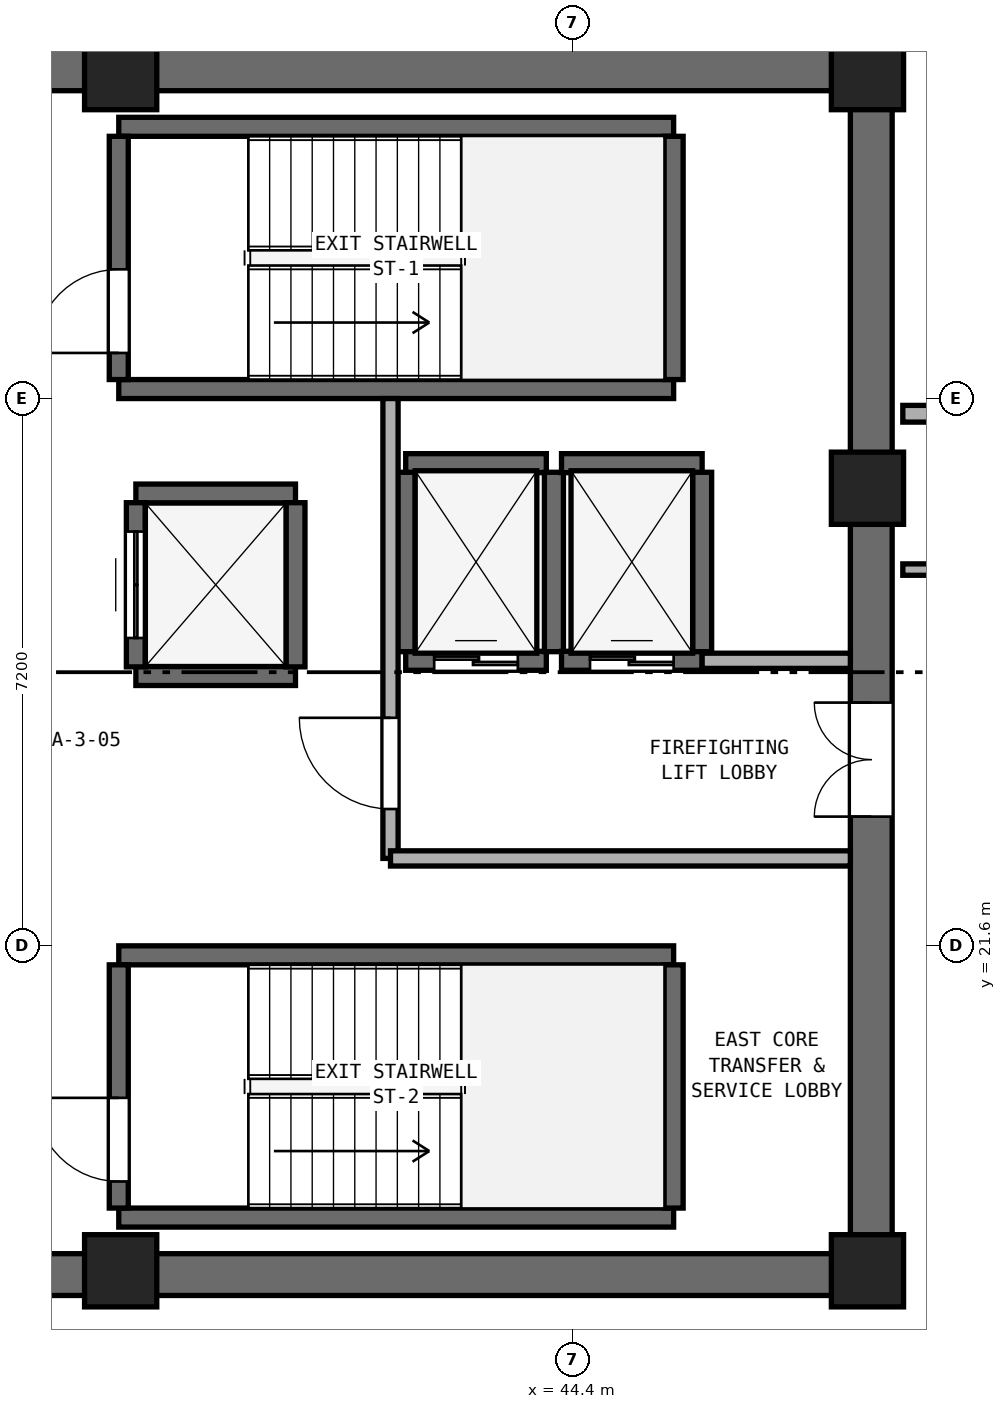
"""IFC4 building model, lengths in metres.
Left out: names, types, materials, properties, quantities, classifications, styles, units other than length and angle.
Written with IfcOpenShell. Run it as: python <this file> out.ifc"""

import sys

from ifc_helpers import new_model, si_unit, direction, frame, frame_2d, origin, origin_2d, place, context, subcontext, project, spatial, rectangle, extrude, element, fill, save


model = new_model("IFC4")
c1 = context("Model", 3, precision=1e-05, world=origin(), true_north=direction((0.0, 1.0)))
c2 = subcontext(c1, "Body", "Model", "MODEL_VIEW")
j1 = project(units=[si_unit("LENGTHUNIT", "METRE"), si_unit("PLANEANGLEUNIT", "RADIAN")], contexts=[c1])
p1 = place(None, origin())
s1 = spatial("IfcSite", under=j1, at=p1, CompositionType="ELEMENT")
p2 = place(p1, origin())
s2 = spatial("IfcBuilding", under=s1, at=p2, CompositionType="ELEMENT")
p3 = place(p2, frame((0.0, 0.0, 151.6)))
s3 = spatial("IfcBuildingStorey", under=s2, at=p3, CompositionType="ELEMENT", Elevation=151.6)
for number, where, z_axis, x_axis in (
    (1, (25.4, 17.275, 0.0), (0.0, 0.0, 1.0), (1.0, 0.0, 0.0)),
    (2, (25.4, 33.125, 0.0), (0.0, 0.0, 1.0), (1.0, 0.0, 0.0)),
):
    element("IfcWall", number, at=place(p3, frame(where, z_axis=z_axis, x_axis=x_axis)), inside=s3, PredefinedType="SHEAR", context=c2, shape_type="SweptSolid", body=[
        extrude(rectangle(XDim=23.2, YDim=0.55, at=frame_2d((11.6, 0.0))), origin(), (0.0, 0.0, 1.0), 3.54),
    ])
p4 = place(p3, frame((48.325, 17.55, 0.0), z_axis=(0.0, 0.0, 1.0), x_axis=(0.0, 1.0, 0.0)))
e3 = element("IfcWall", 3, at=p4, inside=s3, PredefinedType="SHEAR", context=c2, shape_type="SweptSolid", body=[
    extrude(rectangle(XDim=15.3, YDim=0.55, at=frame_2d((7.65, 0.0))), origin(), (0.0, 0.0, 1.0), 3.54),
])
p5 = place(p4, frame((5.75, 0.0, 0.0)))
e4 = element("IfcOpeningElement", 4, at=p5, cuts=e3, PredefinedType="OPENING", context=c2, shape_type="SweptSolid", body=[
    extrude(rectangle(XDim=1.5, YDim=2.15, at=frame_2d((0.75, 1.075))), frame((0.0, 0.285, 0.0), z_axis=(0.0, -1.0, 0.0), x_axis=(1.0, 0.0, 0.0)), (0.0, 0.0, 1.0), 0.57),
])
for number, where, z_axis, x_axis in (
    (5, (38.45, 17.325, 0.0), (0.0, 0.0, 1.0), (1.0, 0.0, 0.0)),
    (6, (48.275, 17.325, 0.0), (0.0, 0.0, 1.0), (1.0, 0.0, 0.0)),
    (7, (48.275, 27.62, 0.0), (0.0, 0.0, 1.0), (1.0, 0.0, 0.0)),
    (8, (48.275, 33.075, 0.0), (0.0, 0.0, 1.0), (1.0, 0.0, 0.0)),
    (9, (38.45, 33.075, 0.0), (0.0, 0.0, 1.0), (1.0, 0.0, 0.0)),
):
    element("IfcColumn", number, at=place(p3, frame(where, z_axis=z_axis, x_axis=x_axis)), inside=s3, PredefinedType="PILASTER", context=c2, shape_type="SweptSolid", body=[
        extrude(rectangle(XDim=0.95, YDim=0.95, at=origin_2d()), origin(), (0.0, 0.0, 1.0), 3.8),
    ])
for number, where, z_axis, x_axis in (
    (10, (38.425, 28.925, 0.0), (0.0, 0.0, 1.0), (1.0, 0.0, 0.0)),
    (11, (38.425, 32.375, 0.0), (0.0, 0.0, 1.0), (1.0, 0.0, 0.0)),
):
    element("IfcWall", number, at=place(p3, frame(where, z_axis=z_axis, x_axis=x_axis)), inside=s3, PredefinedType="SHEAR", context=c2, shape_type="SweptSolid", body=[
        extrude(rectangle(XDim=7.3, YDim=0.25, at=frame_2d((3.65, 0.0))), origin(), (0.0, 0.0, 1.0), 3.54),
    ])
p6 = place(p3, frame((38.425, 29.05, 0.0), z_axis=(0.0, 0.0, 1.0), x_axis=(0.0, 1.0, 0.0)))
e12 = element("IfcWall", 12, at=p6, inside=s3, PredefinedType="SHEAR", context=c2, shape_type="SweptSolid", body=[
    extrude(rectangle(XDim=3.2, YDim=0.25, at=frame_2d((1.6, 0.0))), origin(), (0.0, 0.0, 1.0), 3.54),
])
p7 = place(p6, frame((0.35, 0.0, 0.0)))
e13 = element("IfcOpeningElement", 13, at=p7, cuts=e12, PredefinedType="OPENING", context=c2, shape_type="SweptSolid", body=[
    extrude(rectangle(XDim=1.1, YDim=2.15, at=frame_2d((0.55, 1.075))), frame((0.0, 0.135, 0.0), z_axis=(0.0, -1.0, 0.0), x_axis=(1.0, 0.0, 0.0)), (0.0, 0.0, 1.0), 0.27),
])
p8 = place(p3, frame((45.725, 29.05, 0.0), z_axis=(0.0, 0.0, 1.0), x_axis=(0.0, 1.0, 0.0)))
e14 = element("IfcWall", 14, at=p8, inside=s3, PredefinedType="SHEAR", context=c2, shape_type="SweptSolid", body=[
    extrude(rectangle(XDim=3.2, YDim=0.25, at=frame_2d((1.6, 0.0))), origin(), (0.0, 0.0, 1.0), 3.54),
])
for number, where, z_axis, x_axis in (
    (15, (38.425, 18.025, 0.0), (0.0, 0.0, 1.0), (1.0, 0.0, 0.0)),
    (16, (38.425, 21.475, 0.0), (0.0, 0.0, 1.0), (1.0, 0.0, 0.0)),
):
    element("IfcWall", number, at=place(p3, frame(where, z_axis=z_axis, x_axis=x_axis)), inside=s3, PredefinedType="SHEAR", context=c2, shape_type="SweptSolid", body=[
        extrude(rectangle(XDim=7.3, YDim=0.25, at=frame_2d((3.65, 0.0))), origin(), (0.0, 0.0, 1.0), 3.54),
    ])
p9 = place(p3, frame((38.425, 18.15, 0.0), z_axis=(0.0, 0.0, 1.0), x_axis=(0.0, 1.0, 0.0)))
e17 = element("IfcWall", 17, at=p9, inside=s3, PredefinedType="SHEAR", context=c2, shape_type="SweptSolid", body=[
    extrude(rectangle(XDim=3.2, YDim=0.25, at=frame_2d((1.6, 0.0))), origin(), (0.0, 0.0, 1.0), 3.54),
])
p10 = place(p9, frame((0.35, 0.0, 0.0)))
e18 = element("IfcOpeningElement", 18, at=p10, cuts=e17, PredefinedType="OPENING", context=c2, shape_type="SweptSolid", body=[
    extrude(rectangle(XDim=1.1, YDim=2.15, at=frame_2d((0.55, 1.075))), frame((0.0, 0.135, 0.0), z_axis=(0.0, -1.0, 0.0), x_axis=(1.0, 0.0, 0.0)), (0.0, 0.0, 1.0), 0.27),
])
p11 = place(p3, frame((45.725, 18.15, 0.0), z_axis=(0.0, 0.0, 1.0), x_axis=(0.0, 1.0, 0.0)))
e19 = element("IfcWall", 19, at=p11, inside=s3, PredefinedType="SHEAR", context=c2, shape_type="SweptSolid", body=[
    extrude(rectangle(XDim=3.2, YDim=0.25, at=frame_2d((1.6, 0.0))), origin(), (0.0, 0.0, 1.0), 3.54),
])
p12 = place(p3, frame((42.2, 25.35, 0.0), z_axis=(0.0, 0.0, 1.0), x_axis=(1.0, 0.0, 0.0)))
e20 = element("IfcWall", 20, at=p12, inside=s3, PredefinedType="SHEAR", context=c2, shape_type="SweptSolid", body=[
    extrude(rectangle(XDim=1.85, YDim=0.25, at=frame_2d((0.925, 0.0))), origin(), (0.0, 0.0, 1.0), 3.54),
])
p13 = place(p12, frame((0.375, 0.0, 0.0)))
e21 = element("IfcOpeningElement", 21, at=p13, cuts=e20, PredefinedType="OPENING", context=c2, shape_type="SweptSolid", body=[
    extrude(rectangle(XDim=1.1, YDim=2.15, at=frame_2d((0.55, 1.075))), frame((0.0, 0.135, 0.0), z_axis=(0.0, -1.0, 0.0), x_axis=(1.0, 0.0, 0.0)), (0.0, 0.0, 1.0), 0.27),
])
p14 = place(p3, frame((42.2, 27.95, 0.0), z_axis=(0.0, 0.0, 1.0), x_axis=(1.0, 0.0, 0.0)))
e22 = element("IfcWall", 22, at=p14, inside=s3, PredefinedType="SHEAR", context=c2, shape_type="SweptSolid", body=[
    extrude(rectangle(XDim=1.85, YDim=0.25, at=frame_2d((0.925, 0.0))), origin(), (0.0, 0.0, 1.0), 3.54),
])
for number, where, z_axis, x_axis in (
    (23, (42.2, 25.47, 0.0), (0.0, 0.0, 1.0), (0.0, 1.0, 0.0)),
    (24, (44.15, 25.47, 0.0), (0.0, 0.0, 1.0), (0.0, 1.0, 0.0)),
):
    element("IfcWall", number, at=place(p3, frame(where, z_axis=z_axis, x_axis=x_axis)), inside=s3, PredefinedType="SHEAR", context=c2, shape_type="SweptSolid", body=[
        extrude(rectangle(XDim=2.36, YDim=0.25, at=frame_2d((1.18, 0.0))), origin(), (0.0, 0.0, 1.0), 3.54),
    ])
p15 = place(p3, frame((44.25, 25.35, 0.0), z_axis=(0.0, 0.0, 1.0), x_axis=(1.0, 0.0, 0.0)))
e25 = element("IfcWall", 25, at=p15, inside=s3, PredefinedType="SHEAR", context=c2, shape_type="SweptSolid", body=[
    extrude(rectangle(XDim=1.85, YDim=0.25, at=frame_2d((0.925, 0.0))), origin(), (0.0, 0.0, 1.0), 3.54),
])
p16 = place(p15, frame((0.375, 0.0, 0.0)))
e26 = element("IfcOpeningElement", 26, at=p16, cuts=e25, PredefinedType="OPENING", context=c2, shape_type="SweptSolid", body=[
    extrude(rectangle(XDim=1.1, YDim=2.15, at=frame_2d((0.55, 1.075))), frame((0.0, 0.135, 0.0), z_axis=(0.0, -1.0, 0.0), x_axis=(1.0, 0.0, 0.0)), (0.0, 0.0, 1.0), 0.27),
])
p17 = place(p3, frame((44.25, 27.95, 0.0), z_axis=(0.0, 0.0, 1.0), x_axis=(1.0, 0.0, 0.0)))
e27 = element("IfcWall", 27, at=p17, inside=s3, PredefinedType="SHEAR", context=c2, shape_type="SweptSolid", body=[
    extrude(rectangle(XDim=1.85, YDim=0.25, at=frame_2d((0.925, 0.0))), origin(), (0.0, 0.0, 1.0), 3.54),
])
p18 = place(p3, frame((46.1, 25.47, 0.0), z_axis=(0.0, 0.0, 1.0), x_axis=(0.0, 1.0, 0.0)))
e28 = element("IfcWall", 28, at=p18, inside=s3, PredefinedType="SHEAR", context=c2, shape_type="SweptSolid", body=[
    extrude(rectangle(XDim=2.36, YDim=0.25, at=frame_2d((1.18, 0.0))), origin(), (0.0, 0.0, 1.0), 3.54),
])
for number, where, z_axis, x_axis in (
    (29, (38.65, 25.15, 0.0), (0.0, 0.0, 1.0), (1.0, 0.0, 0.0)),
    (30, (38.65, 27.55, 0.0), (0.0, 0.0, 1.0), (1.0, 0.0, 0.0)),
):
    element("IfcWall", number, at=place(p3, frame(where, z_axis=z_axis, x_axis=x_axis)), inside=s3, PredefinedType="SHEAR", context=c2, shape_type="SweptSolid", body=[
        extrude(rectangle(XDim=2.1, YDim=0.25, at=frame_2d((1.05, 0.0))), origin(), (0.0, 0.0, 1.0), 3.54),
    ])
p19 = place(p3, frame((38.65, 25.27, 0.0), z_axis=(0.0, 0.0, 1.0), x_axis=(0.0, 1.0, 0.0)))
e31 = element("IfcWall", 31, at=p19, inside=s3, PredefinedType="SHEAR", context=c2, shape_type="SweptSolid", body=[
    extrude(rectangle(XDim=2.16, YDim=0.25, at=frame_2d((1.08, 0.0))), origin(), (0.0, 0.0, 1.0), 3.54),
])
p20 = place(p19, frame((0.38, 0.0, 0.0)))
e32 = element("IfcOpeningElement", 32, at=p20, cuts=e31, PredefinedType="OPENING", context=c2, shape_type="SweptSolid", body=[
    extrude(rectangle(XDim=1.4, YDim=2.2, at=frame_2d((0.7, 1.1))), frame((0.0, 0.135, 0.0), z_axis=(0.0, -1.0, 0.0), x_axis=(1.0, 0.0, 0.0)), (0.0, 0.0, 1.0), 0.27),
])
p21 = place(p3, frame((40.75, 25.27, 0.0), z_axis=(0.0, 0.0, 1.0), x_axis=(0.0, 1.0, 0.0)))
e33 = element("IfcWall", 33, at=p21, inside=s3, PredefinedType="SHEAR", context=c2, shape_type="SweptSolid", body=[
    extrude(rectangle(XDim=2.16, YDim=0.25, at=frame_2d((1.08, 0.0))), origin(), (0.0, 0.0, 1.0), 3.54),
])
p22 = place(p3, frame((42.0, 22.75, 0.0), z_axis=(0.0, 0.0, 1.0), x_axis=(0.0, 1.0, 0.0)))
e34 = element("IfcWall", 34, at=p22, inside=s3, PredefinedType="SOLIDWALL", context=c2, shape_type="SweptSolid", body=[
    extrude(rectangle(XDim=6.05, YDim=0.2, at=frame_2d((3.025, 0.0))), origin(), (0.0, 0.0, 1.0), 3.54),
])
p23 = place(p22, frame((0.65, 0.0, 0.0)))
e35 = element("IfcOpeningElement", 35, at=p23, cuts=e34, PredefinedType="OPENING", context=c2, shape_type="SweptSolid", body=[
    extrude(rectangle(XDim=1.2, YDim=2.15, at=frame_2d((0.6, 1.075))), frame((0.0, 0.11, 0.0), z_axis=(0.0, -1.0, 0.0), x_axis=(1.0, 0.0, 0.0)), (0.0, 0.0, 1.0), 0.22),
])
p24 = place(p3, frame((42.0, 22.75, 0.0), z_axis=(0.0, 0.0, 1.0), x_axis=(1.0, 0.0, 0.0)))
e36 = element("IfcWall", 36, at=p24, inside=s3, PredefinedType="SOLIDWALL", context=c2, shape_type="SweptSolid", body=[
    extrude(rectangle(XDim=6.05, YDim=0.2, at=frame_2d((3.025, 0.0))), origin(), (0.0, 0.0, 1.0), 3.54),
])
p25 = place(p3, frame((46.1, 25.35, 0.0), z_axis=(0.0, 0.0, 1.0), x_axis=(1.0, 0.0, 0.0)))
e37 = element("IfcWall", 37, at=p25, inside=s3, PredefinedType="SOLIDWALL", context=c2, shape_type="SweptSolid", body=[
    extrude(rectangle(XDim=1.95, YDim=0.2, at=frame_2d((0.975, 0.0))), origin(), (0.0, 0.0, 1.0), 3.54),
])
p26 = place(p3, frame((48.74, 26.55, 0.0), z_axis=(0.0, 0.0, 1.0), x_axis=(1.0, 0.0, 0.0)))
e38 = element("IfcWall", 38, at=p26, inside=s3, PredefinedType="PARTITIONING", context=c2, shape_type="SweptSolid", body=[
    extrude(rectangle(XDim=12.855, YDim=0.15, at=frame_2d((6.427, 0.0))), origin(), (0.0, 0.0, 1.0), 3.54),
])
p27 = place(p26, frame((5.927, 0.0, 0.0)))
e39 = element("IfcOpeningElement", 39, at=p27, cuts=e38, PredefinedType="OPENING", context=c2, shape_type="SweptSolid", body=[
    extrude(rectangle(XDim=1.0, YDim=2.12, at=frame_2d((0.5, 1.06))), frame((0.0, 0.085, 0.0), z_axis=(0.0, -1.0, 0.0), x_axis=(1.0, 0.0, 0.0)), (0.0, 0.0, 1.0), 0.17),
])
p28 = place(p3, frame((48.74, 28.6, 0.0), z_axis=(0.0, 0.0, 1.0), x_axis=(1.0, 0.0, 0.0)))
e40 = element("IfcWall", 40, at=p28, inside=s3, PredefinedType="PARTITIONING", context=c2, shape_type="SweptSolid", body=[
    extrude(rectangle(XDim=12.855, YDim=0.22, at=frame_2d((6.427, 0.0))), origin(), (0.0, 0.0, 1.0), 3.54),
])
p29 = place(p7, origin())
e41 = element("IfcDoor", 41, at=p29, inside=s3, OperationType="SINGLE_SWING_LEFT", PredefinedType="DOOR", context=c2, shape_type="SweptSolid", body=[
    extrude(rectangle(XDim=1.1, YDim=2.15, at=frame_2d((0.55, 1.075))), frame((0.0, 0.025, 0.0), z_axis=(0.0, -1.0, 0.0), x_axis=(1.0, 0.0, 0.0)), (0.0, 0.0, 1.0), 0.05),
])
fill(e13, e41)
p30 = place(p10, origin())
e42 = element("IfcDoor", 42, at=p30, inside=s3, OperationType="SINGLE_SWING_RIGHT", PredefinedType="DOOR", context=c2, shape_type="SweptSolid", body=[
    extrude(rectangle(XDim=1.1, YDim=2.15, at=frame_2d((0.55, 1.075))), frame((0.0, 0.025, 0.0), z_axis=(0.0, -1.0, 0.0), x_axis=(1.0, 0.0, 0.0)), (0.0, 0.0, 1.0), 0.05),
])
fill(e18, e42)
p31 = place(p13, origin())
e43 = element("IfcDoor", 43, at=p31, inside=s3, OperationType="DOUBLE_DOOR_SLIDING", PredefinedType="DOOR", context=c2, shape_type="SweptSolid", body=[
    extrude(rectangle(XDim=1.1, YDim=2.15, at=frame_2d((0.55, 1.075))), frame((0.0, 0.025, 0.0), z_axis=(0.0, -1.0, 0.0), x_axis=(1.0, 0.0, 0.0)), (0.0, 0.0, 1.0), 0.05),
])
fill(e21, e43)
p32 = place(p16, origin())
e44 = element("IfcDoor", 44, at=p32, inside=s3, OperationType="DOUBLE_DOOR_SLIDING", PredefinedType="DOOR", context=c2, shape_type="SweptSolid", body=[
    extrude(rectangle(XDim=1.1, YDim=2.15, at=frame_2d((0.55, 1.075))), frame((0.0, 0.025, 0.0), z_axis=(0.0, -1.0, 0.0), x_axis=(1.0, 0.0, 0.0)), (0.0, 0.0, 1.0), 0.05),
])
fill(e26, e44)
p33 = place(p20, origin())
e45 = element("IfcDoor", 45, at=p33, inside=s3, OperationType="DOUBLE_DOOR_SLIDING", PredefinedType="DOOR", context=c2, shape_type="SweptSolid", body=[
    extrude(rectangle(XDim=1.4, YDim=2.2, at=frame_2d((0.7, 1.1))), frame((0.0, 0.025, 0.0), z_axis=(0.0, -1.0, 0.0), x_axis=(1.0, 0.0, 0.0)), (0.0, 0.0, 1.0), 0.05),
])
fill(e32, e45)
p34 = place(p23, origin())
e46 = element("IfcDoor", 46, at=p34, inside=s3, OperationType="SINGLE_SWING_RIGHT", PredefinedType="DOOR", context=c2, shape_type="SweptSolid", body=[
    extrude(rectangle(XDim=1.2, YDim=2.15, at=frame_2d((0.6, 1.075))), frame((0.0, 0.025, 0.0), z_axis=(0.0, -1.0, 0.0), x_axis=(1.0, 0.0, 0.0)), (0.0, 0.0, 1.0), 0.05),
])
fill(e35, e46)
p35 = place(p5, origin())
e47 = element("IfcDoor", 47, at=p35, inside=s3, OperationType="DOUBLE_DOOR_SINGLE_SWING", PredefinedType="DOOR", context=c2, shape_type="SweptSolid", body=[
    extrude(rectangle(XDim=1.5, YDim=2.15, at=frame_2d((0.75, 1.075))), frame((0.0, 0.025, 0.0), z_axis=(0.0, -1.0, 0.0), x_axis=(1.0, 0.0, 0.0)), (0.0, 0.0, 1.0), 0.05),
])
fill(e4, e47)
save(model, sys.argv[1])
